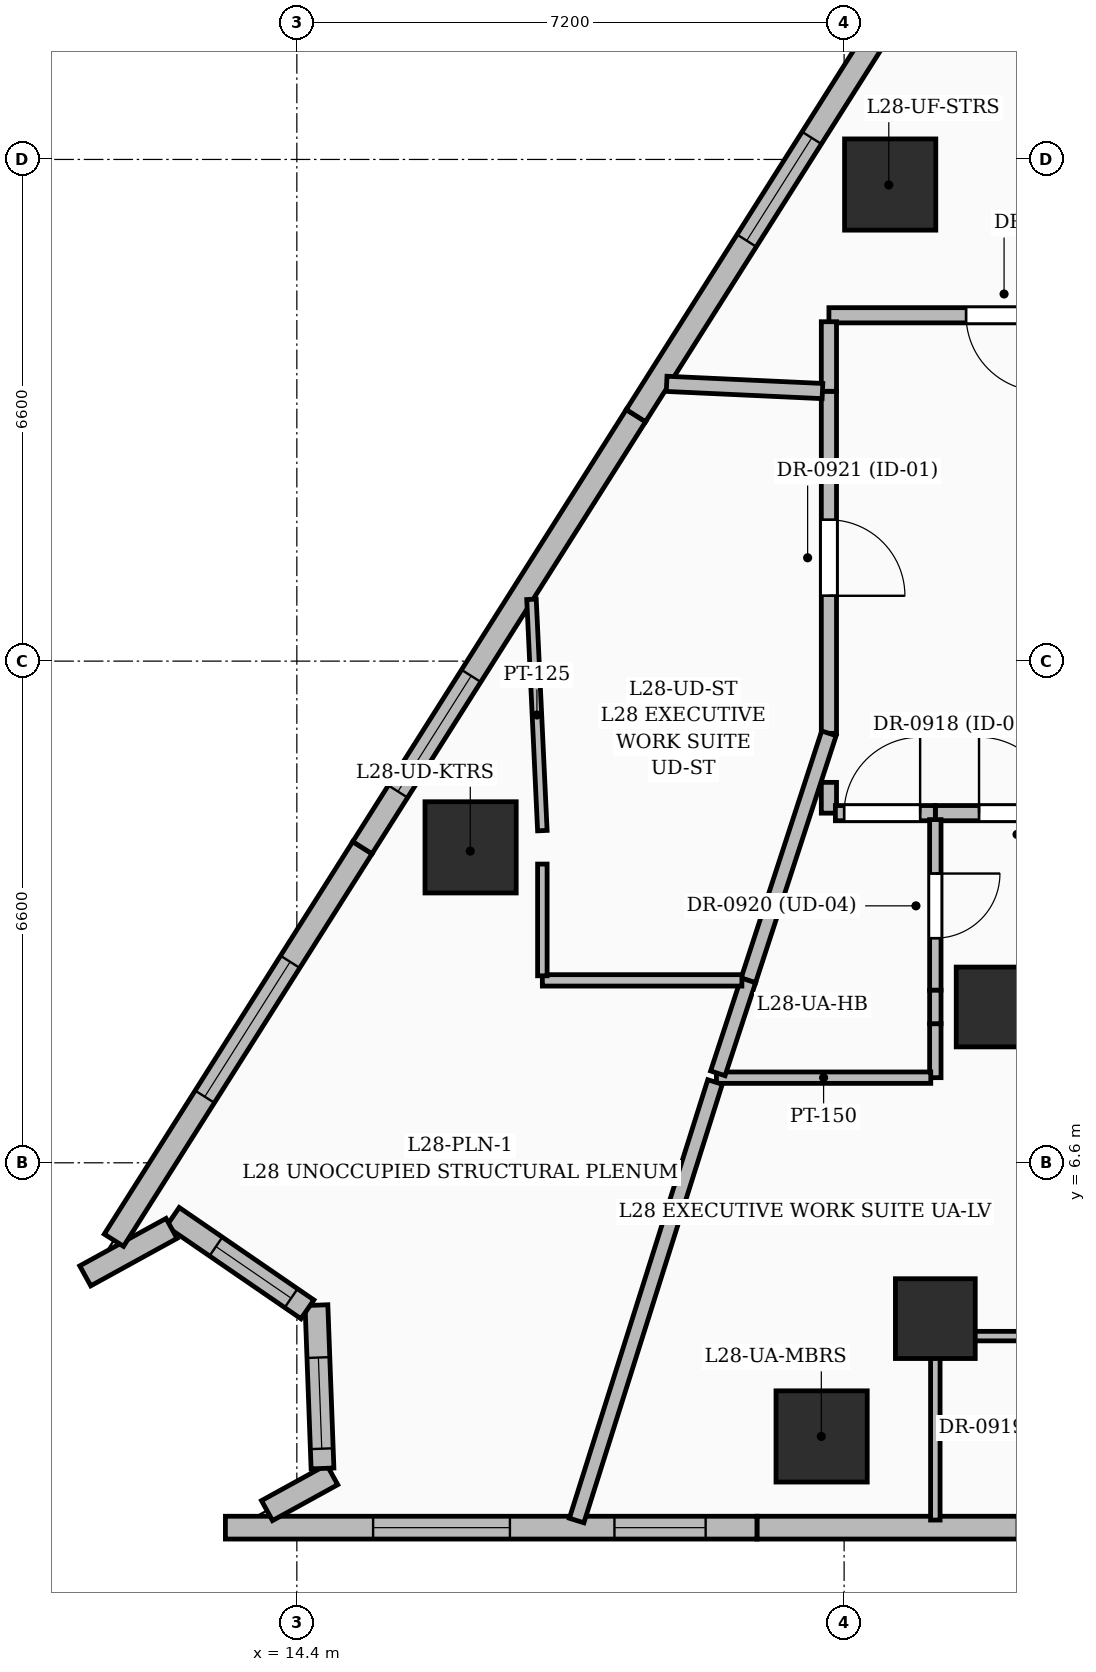
"""IFC4 building model, lengths in metres.
Left out: names, types, materials, properties, quantities, classifications, styles, units other than length and angle.
Written with IfcOpenShell. Run it as: python <this file> out.ifc"""

import sys

from ifc_helpers import new_model, si_unit, direction, frame, frame_2d, origin, origin_2d, place, context, subcontext, project, spatial, rectangle, extrude, element, fill, save


model = new_model("IFC4")
c1 = context("Model", 3, precision=1e-05, world=origin(), true_north=direction((0.0, 1.0)))
c2 = subcontext(c1, "Body", "Model", "MODEL_VIEW")
j1 = project(units=[si_unit("LENGTHUNIT", "METRE"), si_unit("PLANEANGLEUNIT", "RADIAN")], contexts=[c1])
p1 = place(None, origin())
s1 = spatial("IfcSite", under=j1, at=p1, CompositionType="ELEMENT")
p2 = place(p1, origin())
s2 = spatial("IfcBuilding", under=s1, at=p2, CompositionType="ELEMENT")
p3 = place(p2, frame((0.0, 0.0, 114.0)))
s3 = spatial("IfcBuildingStorey", under=s2, at=p3, CompositionType="ELEMENT", Elevation=114.0)
for number, where, z_axis, x_axis in (
    (1, (22.8, 4.55, 0.0), (0.0, 0.0, 1.0), (1.0, 0.0, 0.0)),
    (2, (23.6, 8.65, 0.0), (0.0, 0.0, 1.0), (1.0, 0.0, 0.0)),
):
    element("IfcColumn", number, at=place(p3, frame(where, z_axis=z_axis, x_axis=x_axis)), inside=s3, PredefinedType="COLUMN", context=c2, shape_type="SweptSolid", body=[
        extrude(rectangle(XDim=1.05, YDim=1.05, at=origin_2d()), origin(), (0.0, 0.0, 1.0), 3.6),
    ])
for number, where, z_axis, x_axis in (
    (3, (21.304, 3.0, 0.0), (0.0, 0.0, 1.0), (1.0, 0.0, 0.0)),
    (4, (22.206, 19.47, 0.0), (0.0, 0.0, 1.0), (1.0, 0.0, 0.0)),
    (5, (16.686, 10.75, 0.0), (0.0, 0.0, 1.0), (1.0, 0.0, 0.0)),
):
    element("IfcColumn", number, at=place(p3, frame(where, z_axis=z_axis, x_axis=x_axis)), inside=s3, PredefinedType="COLUMN", context=c2, shape_type="SweptSolid", body=[
        extrude(rectangle(XDim=1.2, YDim=1.2, at=origin_2d()), origin(), (0.0, 0.0, 1.0), 3.6),
    ])
p4 = place(p3, frame((27.447, 1.8, 0.0), z_axis=(0.0, 0.0, 1.0), x_axis=(-1.0, 0.0, 0.0)))
e6 = element("IfcWall", 6, at=p4, inside=s3, PredefinedType="SOLIDWALL", context=c2, shape_type="SweptSolid", body=[
    extrude(rectangle(XDim=6.993, YDim=0.3, at=frame_2d((3.497, 0.0))), origin(), (0.0, 0.0, 1.0), 3.35),
])
p5 = place(p4, frame((1.475, 0.0, 0.55)))
e7 = element("IfcOpeningElement", 7, at=p5, cuts=e6, PredefinedType="OPENING", context=c2, shape_type="SweptSolid", body=[
    extrude(rectangle(XDim=2.1, YDim=2.4, at=frame_2d((1.05, 1.2))), frame((0.0, 0.16, 0.0), z_axis=(0.0, -1.0, 0.0), x_axis=(1.0, 0.0, 0.0)), (0.0, 0.0, 1.0), 0.32),
])
p6 = place(p3, frame((20.453, 1.8, 0.0), z_axis=(0.0, 0.0, 1.0), x_axis=(-1.0, 0.0, 0.0)))
e8 = element("IfcWall", 8, at=p6, inside=s3, PredefinedType="SOLIDWALL", context=c2, shape_type="SweptSolid", body=[
    extrude(rectangle(XDim=6.993, YDim=0.3, at=frame_2d((3.497, 0.0))), origin(), (0.0, 0.0, 1.0), 3.35),
])
p7 = place(p6, frame((0.675, 0.0, 0.8)))
e9 = element("IfcOpeningElement", 9, at=p7, cuts=e8, PredefinedType="OPENING", context=c2, shape_type="SweptSolid", body=[
    extrude(rectangle(XDim=1.2, YDim=1.8, at=frame_2d((0.6, 0.9))), frame((0.0, 0.16, 0.0), z_axis=(0.0, -1.0, 0.0), x_axis=(1.0, 0.0, 0.0)), (0.0, 0.0, 1.0), 0.32),
])
p8 = place(p6, frame((3.25, 0.0, 0.6)))
e10 = element("IfcOpeningElement", 10, at=p8, cuts=e8, PredefinedType="OPENING", context=c2, shape_type="SweptSolid", body=[
    extrude(rectangle(XDim=1.8, YDim=2.1, at=frame_2d((0.9, 1.05))), frame((0.0, 0.16, 0.0), z_axis=(0.0, -1.0, 0.0), x_axis=(1.0, 0.0, 0.0)), (0.0, 0.0, 1.0), 0.32),
])
p9 = place(p3, frame((14.007, 2.024, 0.0), z_axis=(0.0, 0.0, 1.0), x_axis=(0.876089618579, 0.482148296914, 0.0)))
e11 = element("IfcWall", 11, at=p9, inside=s3, PredefinedType="SOLIDWALL", context=c2, shape_type="SweptSolid", body=[
    extrude(rectangle(XDim=0.98, YDim=0.3, at=frame_2d((0.49, 0.0))), origin(), (0.0, 0.0, 1.0), 3.35),
])
p10 = place(p3, frame((14.738, 2.579, 0.0), z_axis=(0.0, 0.0, 1.0), x_axis=(-0.037141892545, 0.99931000186, 0.0)))
e12 = element("IfcWall", 12, at=p10, inside=s3, PredefinedType="SOLIDWALL", context=c2, shape_type="SweptSolid", body=[
    extrude(rectangle(XDim=2.149, YDim=0.3, at=frame_2d((1.075, 0.0))), origin(), (0.0, 0.0, 1.0), 3.35),
])
p11 = place(p10, frame((0.26, 0.0, 0.8)))
e13 = element("IfcOpeningElement", 13, at=p11, cuts=e12, PredefinedType="OPENING", context=c2, shape_type="SweptSolid", body=[
    extrude(rectangle(XDim=1.2, YDim=1.8, at=frame_2d((0.6, 0.9))), frame((0.0, 0.16, 0.0), z_axis=(0.0, -1.0, 0.0), x_axis=(1.0, 0.0, 0.0)), (0.0, 0.0, 1.0), 0.32),
])
p12 = place(p3, frame((14.539, 4.672, 0.0), z_axis=(0.0, 0.0, 1.0), x_axis=(-0.824422928204, 0.565974235678, 0.0)))
e14 = element("IfcWall", 14, at=p12, inside=s3, PredefinedType="SOLIDWALL", context=c2, shape_type="SweptSolid", body=[
    extrude(rectangle(XDim=2.149, YDim=0.3, at=frame_2d((1.075, 0.0))), origin(), (0.0, 0.0, 1.0), 3.35),
])
p13 = place(p12, frame((0.26, 0.0, 0.8)))
e15 = element("IfcOpeningElement", 15, at=p13, cuts=e14, PredefinedType="OPENING", context=c2, shape_type="SweptSolid", body=[
    extrude(rectangle(XDim=1.2, YDim=1.8, at=frame_2d((0.6, 0.9))), frame((0.0, 0.16, 0.0), z_axis=(0.0, -1.0, 0.0), x_axis=(1.0, 0.0, 0.0)), (0.0, 0.0, 1.0), 0.32),
])
p14 = place(p3, frame((12.752, 5.737, 0.0), z_axis=(0.0, 0.0, 1.0), x_axis=(-0.876299432815, -0.481766856527, 0.0)))
e16 = element("IfcWall", 16, at=p14, inside=s3, PredefinedType="SOLIDWALL", context=c2, shape_type="SweptSolid", body=[
    extrude(rectangle(XDim=1.296, YDim=0.3, at=frame_2d((0.648, 0.0))), origin(), (0.0, 0.0, 1.0), 3.35),
])
p15 = place(p3, frame((11.993, 5.581, 0.0), z_axis=(0.0, 0.0, 1.0), x_axis=(0.534883870605, 0.844925585461, 0.0)))
e17 = element("IfcWall", 17, at=p15, inside=s3, PredefinedType="SOLIDWALL", context=c2, shape_type="SweptSolid", body=[
    extrude(rectangle(XDim=6.112, YDim=0.3, at=frame_2d((3.056, 0.0))), origin(), (0.0, 0.0, 1.0), 3.35),
])
p16 = place(p15, frame((2.235, 0.0, 0.55)))
e18 = element("IfcOpeningElement", 18, at=p16, cuts=e17, PredefinedType="OPENING", context=c2, shape_type="SweptSolid", body=[
    extrude(rectangle(XDim=2.1, YDim=2.4, at=frame_2d((1.05, 1.2))), frame((0.0, 0.16, 0.0), z_axis=(0.0, -1.0, 0.0), x_axis=(1.0, 0.0, 0.0)), (0.0, 0.0, 1.0), 0.32),
])
p17 = place(p3, frame((15.262, 10.746, 0.0), z_axis=(0.0, 0.0, 1.0), x_axis=(0.534880248718, 0.844927878302, 0.0)))
e19 = element("IfcWall", 19, at=p17, inside=s3, PredefinedType="SOLIDWALL", context=c2, shape_type="SweptSolid", body=[
    extrude(rectangle(XDim=6.727, YDim=0.3, at=frame_2d((3.364, 0.0))), origin(), (0.0, 0.0, 1.0), 3.35),
])
p18 = place(p17, frame((0.875, 0.0, 0.6)))
e20 = element("IfcOpeningElement", 20, at=p18, cuts=e19, PredefinedType="OPENING", context=c2, shape_type="SweptSolid", body=[
    extrude(rectangle(XDim=1.8, YDim=2.1, at=frame_2d((0.9, 1.05))), frame((0.0, 0.16, 0.0), z_axis=(0.0, -1.0, 0.0), x_axis=(1.0, 0.0, 0.0)), (0.0, 0.0, 1.0), 0.32),
])
p19 = place(p3, frame((18.861, 16.429, 0.0), z_axis=(0.0, 0.0, 1.0), x_axis=(0.534891708764, 0.844920623429, 0.0)))
e21 = element("IfcWall", 21, at=p19, inside=s3, PredefinedType="SOLIDWALL", context=c2, shape_type="SweptSolid", body=[
    extrude(rectangle(XDim=6.447, YDim=0.3, at=frame_2d((3.224, 0.0))), origin(), (0.0, 0.0, 1.0), 3.35),
])
p20 = place(p19, frame((2.725, 0.0, 0.55)))
e22 = element("IfcOpeningElement", 22, at=p20, cuts=e21, PredefinedType="OPENING", context=c2, shape_type="SweptSolid", body=[
    extrude(rectangle(XDim=1.6, YDim=2.2, at=frame_2d((0.8, 1.1))), frame((0.0, 0.16, 0.0), z_axis=(0.0, -1.0, 0.0), x_axis=(1.0, 0.0, 0.0)), (0.0, 0.0, 1.0), 0.32),
])
p21 = place(p3, frame((22.8, 11.2, 0.0), z_axis=(0.0, 0.0, 1.0), x_axis=(1.0, 0.0, 0.0)))
e23 = element("IfcWall", 23, at=p21, inside=s3, PredefinedType="PARTITIONING", context=c2, shape_type="SweptSolid", body=[
    extrude(rectangle(XDim=2.069, YDim=0.2, at=frame_2d((1.035, 0.0))), origin(), (0.0, 0.0, 1.0), 3.35),
])
p22 = place(p21, frame((0.575, 0.0, 0.0)))
e24 = element("IfcOpeningElement", 24, at=p22, cuts=e23, PredefinedType="OPENING", context=c2, shape_type="SweptSolid", body=[
    extrude(rectangle(XDim=1.0, YDim=2.2, at=frame_2d((0.5, 1.1))), frame((0.0, 0.11, 0.0), z_axis=(0.0, -1.0, 0.0), x_axis=(1.0, 0.0, 0.0)), (0.0, 0.0, 1.0), 0.22),
])
p23 = place(p3, frame((21.4, 11.605, 0.0), z_axis=(0.0, 0.0, 1.0), x_axis=(0.0, -1.0, 0.0)))
e25 = element("IfcWall", 25, at=p23, inside=s3, PredefinedType="PARTITIONING", context=c2, shape_type="SweptSolid", body=[
    extrude(rectangle(XDim=0.405, YDim=0.2, at=frame_2d((0.203, 0.0))), origin(), (0.0, 0.0, 1.0), 2.712),
])
p24 = place(p3, frame((21.485, 11.2, 0.0), z_axis=(0.0, 0.0, 1.0), x_axis=(1.0, 0.0, 0.0)))
e26 = element("IfcWall", 26, at=p24, inside=s3, PredefinedType="PARTITIONING", context=c2, shape_type="SweptSolid", body=[
    extrude(rectangle(XDim=1.315, YDim=0.2, at=frame_2d((0.657, 0.0))), origin(), (0.0, 0.0, 1.0), 2.712),
])
p25 = place(p24, frame((0.115, 0.0, 0.0)))
e27 = element("IfcOpeningElement", 27, at=p25, cuts=e26, PredefinedType="OPENING", context=c2, shape_type="SweptSolid", body=[
    extrude(rectangle(XDim=1.0, YDim=2.2, at=frame_2d((0.5, 1.1))), frame((0.0, 0.11, 0.0), z_axis=(0.0, -1.0, 0.0), x_axis=(1.0, 0.0, 0.0)), (0.0, 0.0, 1.0), 0.22),
])
p26 = place(p3, frame((21.4, 16.75, 0.0), z_axis=(0.0, 0.0, 1.0), x_axis=(0.0, -1.0, 0.0)))
e28 = element("IfcWall", 28, at=p26, inside=s3, PredefinedType="PARTITIONING", context=c2, shape_type="SweptSolid", body=[
    extrude(rectangle(XDim=4.5, YDim=0.2, at=frame_2d((2.25, 0.0))), origin(), (0.0, 0.0, 1.0), 2.712),
])
p27 = place(p26, frame((1.69, 0.0, 0.0)))
e29 = element("IfcOpeningElement", 29, at=p27, cuts=e28, PredefinedType="OPENING", context=c2, shape_type="SweptSolid", body=[
    extrude(rectangle(XDim=1.0, YDim=2.2, at=frame_2d((0.5, 1.1))), frame((0.0, 0.11, 0.0), z_axis=(0.0, -1.0, 0.0), x_axis=(1.0, 0.0, 0.0)), (0.0, 0.0, 1.0), 0.22),
])
p28 = place(p3, frame((25.89, 17.75, 0.0), z_axis=(0.0, 0.0, 1.0), x_axis=(-1.0, 0.0, 0.0)))
e30 = element("IfcWall", 30, at=p28, inside=s3, PredefinedType="PARTITIONING", context=c2, shape_type="SweptSolid", body=[
    extrude(rectangle(XDim=4.49, YDim=0.2, at=frame_2d((2.245, 0.0))), origin(), (0.0, 0.0, 1.0), 2.372),
])
p29 = place(p28, frame((1.686, 0.0, 0.0)))
e31 = element("IfcOpeningElement", 31, at=p29, cuts=e30, PredefinedType="OPENING", context=c2, shape_type="SweptSolid", body=[
    extrude(rectangle(XDim=1.0, YDim=2.2, at=frame_2d((0.5, 1.1))), frame((0.0, 0.11, 0.0), z_axis=(0.0, -1.0, 0.0), x_axis=(1.0, 0.0, 0.0)), (0.0, 0.0, 1.0), 0.22),
])
p30 = place(p3, frame((21.4, 17.665, 0.0), z_axis=(0.0, 0.0, 1.0), x_axis=(0.0, -1.0, 0.0)))
e32 = element("IfcWall", 32, at=p30, inside=s3, PredefinedType="PARTITIONING", context=c2, shape_type="SweptSolid", body=[
    extrude(rectangle(XDim=0.915, YDim=0.2, at=frame_2d((0.458, 0.0))), origin(), (0.0, 0.0, 1.0), 2.57),
])
p31 = place(p3, frame((22.8, 8.43, 0.0), z_axis=(0.0, 0.0, 1.0), x_axis=(0.0, -1.0, 0.0)))
e33 = element("IfcWall", 33, at=p31, inside=s3, PredefinedType="PARTITIONING", context=c2, shape_type="SweptSolid", body=[
    extrude(rectangle(XDim=0.71, YDim=0.15, at=frame_2d((0.355, 0.0))), origin(), (0.0, 0.0, 1.0), 3.35),
])
p32 = place(p3, frame((22.8, 11.115, 0.0), z_axis=(0.0, 0.0, 1.0), x_axis=(0.0, -1.0, 0.0)))
e34 = element("IfcWall", 34, at=p32, inside=s3, PredefinedType="PARTITIONING", context=c2, shape_type="SweptSolid", body=[
    extrude(rectangle(XDim=2.245, YDim=0.15, at=frame_2d((1.123, 0.0))), origin(), (0.0, 0.0, 1.0), 2.372),
])
p33 = place(p32, frame((0.709, 0.0, 0.0)))
e35 = element("IfcOpeningElement", 35, at=p33, cuts=e34, PredefinedType="OPENING", context=c2, shape_type="SweptSolid", body=[
    extrude(rectangle(XDim=0.85, YDim=2.1, at=frame_2d((0.425, 1.05))), frame((0.0, 0.085, 0.0), z_axis=(0.0, -1.0, 0.0), x_axis=(1.0, 0.0, 0.0)), (0.0, 0.0, 1.0), 0.17),
])
p34 = place(p3, frame((22.8, 4.32, 0.0), z_axis=(0.0, 0.0, 1.0), x_axis=(1.0, 0.0, 0.0)))
e36 = element("IfcWall", 36, at=p34, inside=s3, PredefinedType="PARTITIONING", context=c2, shape_type="SweptSolid", body=[
    extrude(rectangle(XDim=4.375, YDim=0.125, at=frame_2d((2.188, 0.0))), origin(), (0.0, 0.0, 1.0), 2.436),
])
p35 = place(p34, frame((1.654, 0.0, 0.0)))
e37 = element("IfcOpeningElement", 37, at=p35, cuts=e36, PredefinedType="OPENING", context=c2, shape_type="SweptSolid", body=[
    extrude(rectangle(XDim=0.95, YDim=2.2, at=frame_2d((0.475, 1.1))), frame((0.0, 0.072, 0.0), z_axis=(0.0, -1.0, 0.0), x_axis=(1.0, 0.0, 0.0)), (0.0, 0.0, 1.0), 0.145),
])
p36 = place(p3, frame((19.92, 7.72, 0.0), z_axis=(0.0, 0.0, 1.0), x_axis=(1.0, 0.0, 0.0)))
e38 = element("IfcWall", 38, at=p36, inside=s3, PredefinedType="PARTITIONING", context=c2, shape_type="SweptSolid", body=[
    extrude(rectangle(XDim=2.82, YDim=0.15, at=frame_2d((1.41, 0.0))), origin(), (0.0, 0.0, 1.0), 3.35),
])
p37 = place(p3, frame((21.4, 12.25, 0.0), z_axis=(0.0, 0.0, 1.0), x_axis=(-0.310029019977, -0.950727093741, 0.0)))
e39 = element("IfcWall", 39, at=p37, inside=s3, PredefinedType="PARTITIONING", context=c2, shape_type="SweptSolid", body=[
    extrude(rectangle(XDim=3.418, YDim=0.2, at=frame_2d((1.709, 0.0))), origin(), (0.0, 0.0, 1.0), 2.372),
])
p38 = place(p3, frame((20.34, 9.0, 0.0), z_axis=(0.0, 0.0, 1.0), x_axis=(-0.311842662142, -0.950133755883, 0.0)))
e40 = element("IfcWall", 40, at=p38, inside=s3, PredefinedType="PARTITIONING", context=c2, shape_type="SweptSolid", body=[
    extrude(rectangle(XDim=1.287, YDim=0.2, at=frame_2d((0.644, 0.0))), origin(), (0.0, 0.0, 1.0), 3.35),
])
p39 = place(p3, frame((22.8, 4.272, 0.0), z_axis=(0.0, 0.0, 1.0), x_axis=(0.0, -1.0, 0.0)))
e41 = element("IfcWall", 41, at=p39, inside=s3, PredefinedType="PARTITIONING", context=c2, shape_type="SweptSolid", body=[
    extrude(rectangle(XDim=2.373, YDim=0.125, at=frame_2d((1.186, 0.0))), origin(), (0.0, 0.0, 1.0), 2.57),
])
p40 = place(p3, frame((19.902, 7.663, 0.0), z_axis=(0.0, 0.0, 1.0), x_axis=(-0.300992296292, -0.953626571344, 0.0)))
e42 = element("IfcWall", 42, at=p40, inside=s3, PredefinedType="PARTITIONING", context=c2, shape_type="SweptSolid", body=[
    extrude(rectangle(XDim=6.049, YDim=0.2, at=frame_2d((3.025, 0.0))), origin(), (0.0, 0.0, 1.0), 2.57),
])
p41 = place(p3, frame((17.63, 9.0, 0.0), z_axis=(0.0, 0.0, 1.0), x_axis=(1.0, 0.0, 0.0)))
e43 = element("IfcWall", 43, at=p41, inside=s3, PredefinedType="PARTITIONING", context=c2, shape_type="SweptSolid", body=[
    extrude(rectangle(XDim=2.625, YDim=0.15, at=frame_2d((1.312, 0.0))), origin(), (0.0, 0.0, 1.0), 2.57),
])
p42 = place(p3, frame((17.63, 10.53, 0.0), z_axis=(0.0, 0.0, 1.0), x_axis=(0.0, -1.0, 0.0)))
e44 = element("IfcWall", 44, at=p42, inside=s3, PredefinedType="PARTITIONING", context=c2, shape_type="SweptSolid", body=[
    extrude(rectangle(XDim=1.47, YDim=0.125, at=frame_2d((0.735, 0.0))), origin(), (0.0, 0.0, 1.0), 2.372),
])
p43 = place(p3, frame((17.487, 14.013, 0.0), z_axis=(0.0, 0.0, 1.0), x_axis=(0.046883561563, -0.998900361225, 0.0)))
e45 = element("IfcWall", 45, at=p43, inside=s3, PredefinedType="PARTITIONING", context=c2, shape_type="SweptSolid", body=[
    extrude(rectangle(XDim=3.046, YDim=0.125, at=frame_2d((1.523, 0.0))), origin(), (0.0, 0.0, 1.0), 2.57),
])
p44 = place(p3, frame((21.315, 16.753, 0.0), z_axis=(0.0, 0.0, 1.0), x_axis=(-0.998928926466, 0.046270939795, 0.0)))
e46 = element("IfcWall", 46, at=p44, inside=s3, PredefinedType="PARTITIONING", context=c2, shape_type="SweptSolid", body=[
    extrude(rectangle(XDim=2.052, YDim=0.2, at=frame_2d((1.026, 0.0))), origin(), (0.0, 0.0, 1.0), 2.57),
])
p45 = place(p3, frame((22.8, 8.43, 0.0), z_axis=(0.0, 0.0, 1.0), x_axis=(0.0, 1.0, 0.0)))
e47 = element("IfcWall", 47, at=p45, inside=s3, PredefinedType="PARTITIONING", context=c2, shape_type="SweptSolid", body=[
    extrude(rectangle(XDim=0.44, YDim=0.15, at=frame_2d((0.22, 0.0))), origin(), (0.0, 0.0, 1.0), 2.372),
])
p46 = place(p7, origin())
e48 = element("IfcWindow", 48, at=p46, inside=s3, PartitioningType="SINGLE_PANEL", PredefinedType="WINDOW", context=c2, shape_type="SweptSolid", body=[
    extrude(rectangle(XDim=1.2, YDim=1.8, at=frame_2d((0.6, 0.9))), frame((0.0, 0.03, 0.0), z_axis=(0.0, -1.0, 0.0), x_axis=(1.0, 0.0, 0.0)), (0.0, 0.0, 1.0), 0.06),
])
fill(e9, e48)
p47 = place(p8, origin())
e49 = element("IfcWindow", 49, at=p47, inside=s3, PartitioningType="SINGLE_PANEL", PredefinedType="WINDOW", context=c2, shape_type="SweptSolid", body=[
    extrude(rectangle(XDim=1.8, YDim=2.1, at=frame_2d((0.9, 1.05))), frame((0.0, 0.03, 0.0), z_axis=(0.0, -1.0, 0.0), x_axis=(1.0, 0.0, 0.0)), (0.0, 0.0, 1.0), 0.06),
])
fill(e10, e49)
p48 = place(p11, origin())
e50 = element("IfcWindow", 50, at=p48, inside=s3, PartitioningType="SINGLE_PANEL", PredefinedType="WINDOW", context=c2, shape_type="SweptSolid", body=[
    extrude(rectangle(XDim=1.2, YDim=1.8, at=frame_2d((0.6, 0.9))), frame((0.0, 0.03, 0.0), z_axis=(0.0, -1.0, 0.0), x_axis=(1.0, 0.0, 0.0)), (0.0, 0.0, 1.0), 0.06),
])
fill(e13, e50)
p49 = place(p13, origin())
e51 = element("IfcWindow", 51, at=p49, inside=s3, PartitioningType="SINGLE_PANEL", PredefinedType="WINDOW", context=c2, shape_type="SweptSolid", body=[
    extrude(rectangle(XDim=1.2, YDim=1.8, at=frame_2d((0.6, 0.9))), frame((0.0, 0.03, 0.0), z_axis=(0.0, -1.0, 0.0), x_axis=(1.0, 0.0, 0.0)), (0.0, 0.0, 1.0), 0.06),
])
fill(e15, e51)
p50 = place(p16, origin())
e52 = element("IfcWindow", 52, at=p50, inside=s3, PartitioningType="SINGLE_PANEL", PredefinedType="WINDOW", context=c2, shape_type="SweptSolid", body=[
    extrude(rectangle(XDim=2.1, YDim=2.4, at=frame_2d((1.05, 1.2))), frame((0.0, 0.03, 0.0), z_axis=(0.0, -1.0, 0.0), x_axis=(1.0, 0.0, 0.0)), (0.0, 0.0, 1.0), 0.06),
])
fill(e18, e52)
p51 = place(p18, origin())
e53 = element("IfcWindow", 53, at=p51, inside=s3, PartitioningType="SINGLE_PANEL", PredefinedType="WINDOW", context=c2, shape_type="SweptSolid", body=[
    extrude(rectangle(XDim=1.8, YDim=2.1, at=frame_2d((0.9, 1.05))), frame((0.0, 0.03, 0.0), z_axis=(0.0, -1.0, 0.0), x_axis=(1.0, 0.0, 0.0)), (0.0, 0.0, 1.0), 0.06),
])
fill(e20, e53)
p52 = place(p20, origin())
e54 = element("IfcWindow", 54, at=p52, inside=s3, PartitioningType="SINGLE_PANEL", PredefinedType="WINDOW", context=c2, shape_type="SweptSolid", body=[
    extrude(rectangle(XDim=1.6, YDim=2.2, at=frame_2d((0.8, 1.1))), frame((0.0, 0.03, 0.0), z_axis=(0.0, -1.0, 0.0), x_axis=(1.0, 0.0, 0.0)), (0.0, 0.0, 1.0), 0.06),
])
fill(e22, e54)
p53 = place(p22, origin())
e55 = element("IfcDoor", 55, at=p53, inside=s3, OperationType="SINGLE_SWING_LEFT", PredefinedType="DOOR", context=c2, shape_type="SweptSolid", body=[
    extrude(rectangle(XDim=1.0, YDim=2.2, at=frame_2d((0.5, 1.1))), frame((0.0, 0.025, 0.0), z_axis=(0.0, -1.0, 0.0), x_axis=(1.0, 0.0, 0.0)), (0.0, 0.0, 1.0), 0.05),
])
fill(e24, e55)
p54 = place(p33, origin())
e56 = element("IfcDoor", 56, at=p54, inside=s3, OperationType="SINGLE_SWING_LEFT", PredefinedType="DOOR", context=c2, shape_type="SweptSolid", body=[
    extrude(rectangle(XDim=0.85, YDim=2.1, at=frame_2d((0.425, 1.05))), frame((0.0, 0.025, 0.0), z_axis=(0.0, -1.0, 0.0), x_axis=(1.0, 0.0, 0.0)), (0.0, 0.0, 1.0), 0.05),
])
fill(e35, e56)
p55 = place(p27, origin())
e57 = element("IfcDoor", 57, at=p55, inside=s3, OperationType="SINGLE_SWING_RIGHT", PredefinedType="DOOR", context=c2, shape_type="SweptSolid", body=[
    extrude(rectangle(XDim=1.0, YDim=2.2, at=frame_2d((0.5, 1.1))), frame((0.0, 0.025, 0.0), z_axis=(0.0, -1.0, 0.0), x_axis=(1.0, 0.0, 0.0)), (0.0, 0.0, 1.0), 0.05),
])
fill(e29, e57)
p56 = place(p29, origin())
e58 = element("IfcDoor", 58, at=p56, inside=s3, OperationType="SINGLE_SWING_LEFT", PredefinedType="DOOR", context=c2, shape_type="SweptSolid", body=[
    extrude(rectangle(XDim=1.0, YDim=2.2, at=frame_2d((0.5, 1.1))), frame((0.0, 0.025, 0.0), z_axis=(0.0, -1.0, 0.0), x_axis=(1.0, 0.0, 0.0)), (0.0, 0.0, 1.0), 0.05),
])
fill(e31, e58)
p57 = place(p25, origin())
e59 = element("IfcDoor", 59, at=p57, inside=s3, OperationType="SINGLE_SWING_RIGHT", PredefinedType="DOOR", context=c2, shape_type="SweptSolid", body=[
    extrude(rectangle(XDim=1.0, YDim=2.2, at=frame_2d((0.5, 1.1))), frame((0.0, 0.025, 0.0), z_axis=(0.0, -1.0, 0.0), x_axis=(1.0, 0.0, 0.0)), (0.0, 0.0, 1.0), 0.05),
])
fill(e27, e59)
save(model, sys.argv[1])
